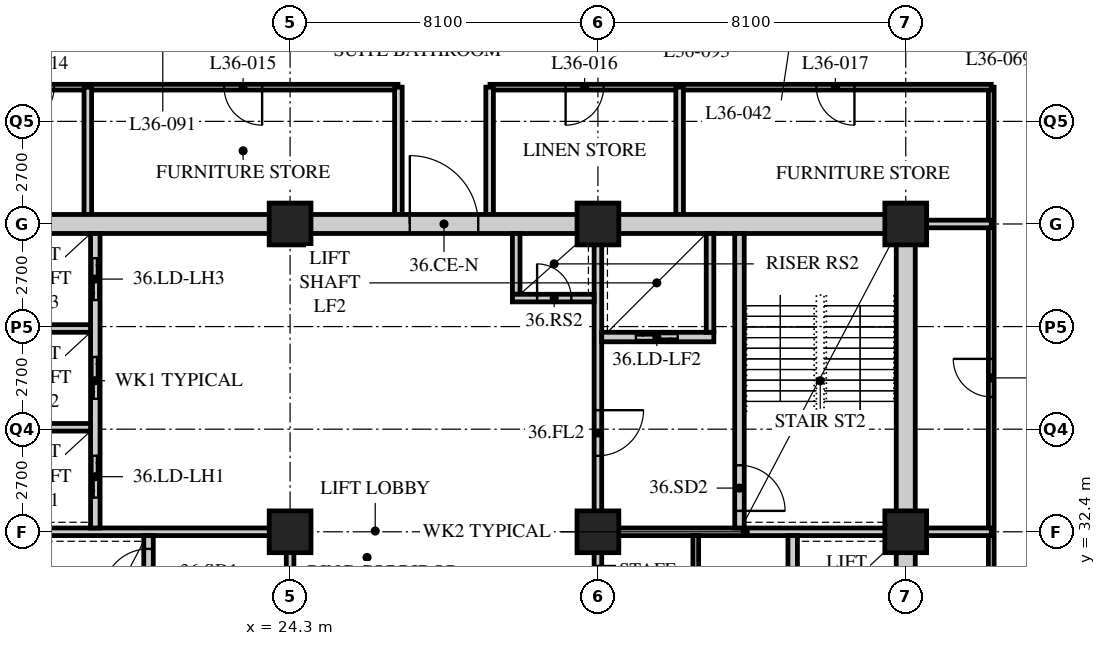
"""IFC4 building model, lengths in metres.
Left out: names, types, materials, properties, quantities, classifications, styles, units other than length and angle.
Written with IfcOpenShell. Run it as: python <this file> out.ifc"""

import sys

from ifc_helpers import new_model, si_unit, direction, frame, frame_2d, origin, origin_2d, place, context, subcontext, project, spatial, rectangle, hollow_rectangle, extrude, element, fill, save


model = new_model("IFC4")
c1 = context("Model", 3, precision=1e-05, world=origin(), true_north=direction((0.0, 1.0)))
c2 = subcontext(c1, "Body", "Model", "MODEL_VIEW")
j1 = project(units=[si_unit("LENGTHUNIT", "METRE"), si_unit("PLANEANGLEUNIT", "RADIAN")], contexts=[c1])
p1 = place(None, origin())
s1 = spatial("IfcSite", under=j1, at=p1, CompositionType="ELEMENT")
p2 = place(p1, origin())
s2 = spatial("IfcBuilding", under=s1, at=p2, CompositionType="ELEMENT")
p3 = place(p2, frame((0.0, 0.0, 140.8)))
s3 = spatial("IfcBuildingStorey", under=s2, at=p3, CompositionType="ELEMENT", Elevation=140.8)
for number, where, z_axis, x_axis in (
    (1, (24.3, 32.4, 0.0), (0.0, 0.0, 1.0), (1.0, 0.0, 0.0)),
    (2, (24.3, 40.5, 0.0), (0.0, 0.0, 1.0), (1.0, 0.0, 0.0)),
    (3, (32.4, 32.4, 0.0), (0.0, 0.0, 1.0), (1.0, 0.0, 0.0)),
    (4, (32.4, 40.5, 0.0), (0.0, 0.0, 1.0), (1.0, 0.0, 0.0)),
    (5, (40.5, 32.4, 0.0), (0.0, 0.0, 1.0), (1.0, 0.0, 0.0)),
    (6, (40.5, 40.5, 0.0), (0.0, 0.0, 1.0), (1.0, 0.0, 0.0)),
):
    element("IfcColumn", number, at=place(p3, frame(where, z_axis=z_axis, x_axis=x_axis)), inside=s3, PredefinedType="COLUMN", context=c2, shape_type="SweptSolid", body=[
        extrude(hollow_rectangle(XDim=1.1, YDim=1.1, WallThickness=0.1, at=origin_2d()), origin(), (0.0, 0.0, 1.0), 3.4),
    ])
p4 = place(p3, frame((42.75, 19.35, 0.0), z_axis=(0.0, 0.0, 1.0), x_axis=(0.0, 1.0, 0.0)))
e7 = element("IfcWall", 7, at=p4, inside=s3, PredefinedType="PARTITIONING", context=c2, shape_type="SweptSolid", body=[
    extrude(rectangle(XDim=24.75, YDim=0.15, at=frame_2d((12.375, 0.0))), origin(), (0.0, 0.0, 1.0), 3.19),
])
p5 = place(p4, frame((8.5, 0.0, 0.0)))
e8 = element("IfcOpeningElement", 8, at=p5, cuts=e7, PredefinedType="OPENING", context=c2, shape_type="SweptSolid", body=[
    extrude(rectangle(XDim=1.0, YDim=2.1, at=frame_2d((0.5, 1.05))), frame((0.0, 0.085, 0.0), z_axis=(0.0, -1.0, 0.0), x_axis=(1.0, 0.0, 0.0)), (0.0, 0.0, 1.0), 0.17),
])
p6 = place(p4, frame((16.6, 0.0, 0.0)))
e9 = element("IfcOpeningElement", 9, at=p6, cuts=e7, PredefinedType="OPENING", context=c2, shape_type="SweptSolid", body=[
    extrude(rectangle(XDim=1.0, YDim=2.1, at=frame_2d((0.5, 1.05))), frame((0.0, 0.085, 0.0), z_axis=(0.0, -1.0, 0.0), x_axis=(1.0, 0.0, 0.0)), (0.0, 0.0, 1.0), 0.17),
])
p7 = place(p3, frame((42.75, 44.1, 0.0), z_axis=(0.0, 0.0, 1.0), x_axis=(-1.0, 0.0, 0.0)))
e10 = element("IfcWall", 10, at=p7, inside=s3, PredefinedType="PARTITIONING", context=c2, shape_type="SweptSolid", body=[
    extrude(rectangle(XDim=13.19, YDim=0.15, at=frame_2d((6.595, 0.0))), origin(), (0.0, 0.0, 1.0), 3.19),
])
p8 = place(p7, frame((10.2, 0.0, 0.0)))
e11 = element("IfcOpeningElement", 11, at=p8, cuts=e10, PredefinedType="OPENING", context=c2, shape_type="SweptSolid", body=[
    extrude(rectangle(XDim=1.0, YDim=2.1, at=frame_2d((0.5, 1.05))), frame((0.0, 0.085, 0.0), z_axis=(0.0, -1.0, 0.0), x_axis=(1.0, 0.0, 0.0)), (0.0, 0.0, 1.0), 0.17),
])
p9 = place(p7, frame((3.6, 0.0, 0.0)))
e12 = element("IfcOpeningElement", 12, at=p9, cuts=e10, PredefinedType="OPENING", context=c2, shape_type="SweptSolid", body=[
    extrude(rectangle(XDim=1.0, YDim=2.1, at=frame_2d((0.5, 1.05))), frame((0.0, 0.085, 0.0), z_axis=(0.0, -1.0, 0.0), x_axis=(1.0, 0.0, 0.0)), (0.0, 0.0, 1.0), 0.17),
])
p10 = place(p3, frame((27.14, 44.1, 0.0), z_axis=(0.0, 0.0, 1.0), x_axis=(-1.0, 0.0, 0.0)))
e13 = element("IfcWall", 13, at=p10, inside=s3, PredefinedType="PARTITIONING", context=c2, shape_type="SweptSolid", body=[
    extrude(rectangle(XDim=17.24, YDim=0.15, at=frame_2d((8.62, 0.0))), origin(), (0.0, 0.0, 1.0), 3.19),
])
p11 = place(p10, frame((13.59, 0.0, 0.0)))
e14 = element("IfcOpeningElement", 14, at=p11, cuts=e13, PredefinedType="OPENING", context=c2, shape_type="SweptSolid", body=[
    extrude(rectangle(XDim=1.0, YDim=2.1, at=frame_2d((0.5, 1.05))), frame((0.0, 0.085, 0.0), z_axis=(0.0, -1.0, 0.0), x_axis=(1.0, 0.0, 0.0)), (0.0, 0.0, 1.0), 0.17),
])
p12 = place(p10, frame((9.051, 0.0, 0.0)))
e15 = element("IfcOpeningElement", 15, at=p12, cuts=e13, PredefinedType="OPENING", context=c2, shape_type="SweptSolid", body=[
    extrude(rectangle(XDim=1.0, YDim=2.1, at=frame_2d((0.5, 1.05))), frame((0.0, 0.085, 0.0), z_axis=(0.0, -1.0, 0.0), x_axis=(1.0, 0.0, 0.0)), (0.0, 0.0, 1.0), 0.17),
])
p13 = place(p10, frame((3.576, 0.0, 0.0)))
e16 = element("IfcOpeningElement", 16, at=p13, cuts=e13, PredefinedType="OPENING", context=c2, shape_type="SweptSolid", body=[
    extrude(rectangle(XDim=1.0, YDim=2.1, at=frame_2d((0.5, 1.05))), frame((0.0, 0.085, 0.0), z_axis=(0.0, -1.0, 0.0), x_axis=(1.0, 0.0, 0.0)), (0.0, 0.0, 1.0), 0.17),
])
p14 = place(p3, frame((40.5, 32.4, 0.0), z_axis=(0.0, 0.0, 1.0), x_axis=(1.0, 0.0, 0.0)))
e17 = element("IfcWall", 17, at=p14, inside=s3, PredefinedType="SOLIDWALL", context=c2, shape_type="SweptSolid", body=[
    extrude(rectangle(XDim=2.25, YDim=0.2, at=frame_2d((1.125, 0.0))), origin(), (0.0, 0.0, 1.0), 3.19),
])
for number, where, z_axis, x_axis in (
    (18, (18.978, 44.1, 0.0), (0.0, 0.0, 1.0), (0.0, -1.0, 0.0)),
    (19, (34.55, 44.1, 0.0), (0.0, 0.0, 1.0), (0.0, -1.0, 0.0)),
    (20, (27.15, 40.5, 0.0), (0.0, 0.0, 1.0), (0.0, 1.0, 0.0)),
    (21, (29.55, 40.5, 0.0), (0.0, 0.0, 1.0), (0.0, 1.0, 0.0)),
):
    element("IfcWall", number, at=place(p3, frame(where, z_axis=z_axis, x_axis=x_axis)), inside=s3, PredefinedType="SOLIDWALL", context=c2, shape_type="SweptSolid", body=[
        extrude(rectangle(XDim=3.6, YDim=0.2, at=frame_2d((1.8, 0.0))), origin(), (0.0, 0.0, 1.0), 3.19),
    ])
p15 = place(p3, frame((40.5, 40.5, 0.0), z_axis=(0.0, 0.0, 1.0), x_axis=(1.0, 0.0, 0.0)))
e22 = element("IfcWall", 22, at=p15, inside=s3, PredefinedType="SOLIDWALL", context=c2, shape_type="SweptSolid", body=[
    extrude(rectangle(XDim=2.25, YDim=0.2, at=frame_2d((1.125, 0.0))), origin(), (0.0, 0.0, 1.0), 3.19),
])
p16 = place(p3, frame((15.95, 40.5, 0.0), z_axis=(0.0, 0.0, 1.0), x_axis=(1.0, 0.0, 0.0)))
e23 = element("IfcWall", 23, at=p16, inside=s3, PredefinedType="SOLIDWALL", context=c2, shape_type="SweptSolid", body=[
    extrude(rectangle(XDim=24.8, YDim=0.5, at=frame_2d((12.4, 0.0))), origin(), (0.0, 0.0, 1.0), 2.54),
])
p17 = place(p16, frame((11.5, 0.0, 0.0)))
e24 = element("IfcOpeningElement", 24, at=p17, cuts=e23, PredefinedType="OPENING", context=c2, shape_type="SweptSolid", body=[
    extrude(rectangle(XDim=1.8, YDim=2.4, at=frame_2d((0.9, 1.2))), frame((0.0, 0.26, 0.0), z_axis=(0.0, -1.0, 0.0), x_axis=(1.0, 0.0, 0.0)), (0.0, 0.0, 1.0), 0.52),
])
p18 = place(p3, frame((40.5, 24.55, 0.0), z_axis=(0.0, 0.0, 1.0), x_axis=(0.0, 1.0, 0.0)))
e25 = element("IfcWall", 25, at=p18, inside=s3, PredefinedType="SOLIDWALL", context=c2, shape_type="SweptSolid", body=[
    extrude(rectangle(XDim=15.7, YDim=0.5, at=frame_2d((7.85, 0.0))), origin(), (0.0, 0.0, 1.0), 2.578),
])
p19 = place(p3, frame((16.45, 32.4, 0.0), z_axis=(0.0, 0.0, 1.0), x_axis=(1.0, 0.0, 0.0)))
e26 = element("IfcWall", 26, at=p19, inside=s3, PredefinedType="SOLIDWALL", context=c2, shape_type="SweptSolid", body=[
    extrude(rectangle(XDim=7.95, YDim=0.2, at=frame_2d((3.975, 0.0))), origin(), (0.0, 0.0, 1.0), 2.578),
])
p20 = place(p3, frame((24.3, 24.55, 0.0), z_axis=(0.0, 0.0, 1.0), x_axis=(0.0, 1.0, 0.0)))
e27 = element("IfcWall", 27, at=p20, inside=s3, PredefinedType="SOLIDWALL", context=c2, shape_type="SweptSolid", body=[
    extrude(rectangle(XDim=7.75, YDim=0.2, at=frame_2d((3.875, 0.0))), origin(), (0.0, 0.0, 1.0), 2.578),
])
p21 = place(p20, frame((4.6, 0.0, 0.0)))
e28 = element("IfcOpeningElement", 28, at=p21, cuts=e27, PredefinedType="OPENING", context=c2, shape_type="SweptSolid", body=[
    extrude(rectangle(XDim=1.2, YDim=2.1, at=frame_2d((0.6, 1.05))), frame((0.0, 0.11, 0.0), z_axis=(0.0, -1.0, 0.0), x_axis=(1.0, 0.0, 0.0)), (0.0, 0.0, 1.0), 0.22),
])
p22 = place(p3, frame((20.575, 24.55, 0.0), z_axis=(0.0, 0.0, 1.0), x_axis=(0.0, 1.0, 0.0)))
e29 = element("IfcWall", 29, at=p22, inside=s3, PredefinedType="SOLIDWALL", context=c2, shape_type="SweptSolid", body=[
    extrude(rectangle(XDim=7.75, YDim=0.25, at=frame_2d((3.875, 0.0))), origin(), (0.0, 0.0, 1.0), 3.19),
])
p23 = place(p22, frame((6.2, 0.0, 0.0)))
e30 = element("IfcOpeningElement", 30, at=p23, cuts=e29, PredefinedType="OPENING", context=c2, shape_type="SweptSolid", body=[
    extrude(rectangle(XDim=1.2, YDim=2.1, at=frame_2d((0.6, 1.05))), frame((0.0, 0.135, 0.0), z_axis=(0.0, -1.0, 0.0), x_axis=(1.0, 0.0, 0.0)), (0.0, 0.0, 1.0), 0.27),
])
p24 = place(p3, frame((19.175, 32.5, 0.0), z_axis=(0.0, 0.0, 1.0), x_axis=(0.0, 1.0, 0.0)))
e31 = element("IfcWall", 31, at=p24, inside=s3, PredefinedType="SOLIDWALL", context=c2, shape_type="SweptSolid", body=[
    extrude(rectangle(XDim=7.75, YDim=0.25, at=frame_2d((3.875, 0.0))), origin(), (0.0, 0.0, 1.0), 3.19),
])
p25 = place(p24, frame((0.8, 0.0, 0.0)))
e32 = element("IfcOpeningElement", 32, at=p25, cuts=e31, PredefinedType="OPENING", context=c2, shape_type="SweptSolid", body=[
    extrude(rectangle(XDim=1.1, YDim=2.4, at=frame_2d((0.55, 1.2))), frame((0.0, 0.135, 0.0), z_axis=(0.0, -1.0, 0.0), x_axis=(1.0, 0.0, 0.0)), (0.0, 0.0, 1.0), 0.27),
])
p26 = place(p24, frame((3.4, 0.0, 0.0)))
e33 = element("IfcOpeningElement", 33, at=p26, cuts=e31, PredefinedType="OPENING", context=c2, shape_type="SweptSolid", body=[
    extrude(rectangle(XDim=1.1, YDim=2.4, at=frame_2d((0.55, 1.2))), frame((0.0, 0.135, 0.0), z_axis=(0.0, -1.0, 0.0), x_axis=(1.0, 0.0, 0.0)), (0.0, 0.0, 1.0), 0.27),
])
p27 = place(p24, frame((6.0, 0.0, 0.0)))
e34 = element("IfcOpeningElement", 34, at=p27, cuts=e31, PredefinedType="OPENING", context=c2, shape_type="SweptSolid", body=[
    extrude(rectangle(XDim=1.1, YDim=2.4, at=frame_2d((0.55, 1.2))), frame((0.0, 0.135, 0.0), z_axis=(0.0, -1.0, 0.0), x_axis=(1.0, 0.0, 0.0)), (0.0, 0.0, 1.0), 0.27),
])
for number, where, z_axis, x_axis in (
    (35, (16.45, 35.15, 0.0), (0.0, 0.0, 1.0), (1.0, 0.0, 0.0)),
    (36, (16.45, 37.75, 0.0), (0.0, 0.0, 1.0), (1.0, 0.0, 0.0)),
):
    element("IfcWall", number, at=place(p3, frame(where, z_axis=z_axis, x_axis=x_axis)), inside=s3, PredefinedType="SOLIDWALL", context=c2, shape_type="SweptSolid", body=[
        extrude(rectangle(XDim=2.6, YDim=0.2, at=frame_2d((1.3, 0.0))), origin(), (0.0, 0.0, 1.0), 3.19),
    ])
p28 = place(p3, frame((32.3, 32.4, 0.0), z_axis=(0.0, 0.0, 1.0), x_axis=(1.0, 0.0, 0.0)))
e37 = element("IfcWall", 37, at=p28, inside=s3, PredefinedType="SOLIDWALL", context=c2, shape_type="SweptSolid", body=[
    extrude(rectangle(XDim=7.95, YDim=0.2, at=frame_2d((3.975, 0.0))), origin(), (0.0, 0.0, 1.0), 2.578),
])
p29 = place(p3, frame((32.4, 32.5, 0.0), z_axis=(0.0, 0.0, 1.0), x_axis=(0.0, 1.0, 0.0)))
e38 = element("IfcWall", 38, at=p29, inside=s3, PredefinedType="SOLIDWALL", context=c2, shape_type="SweptSolid", body=[
    extrude(rectangle(XDim=7.75, YDim=0.2, at=frame_2d((3.875, 0.0))), origin(), (0.0, 0.0, 1.0), 2.578),
])
p30 = place(p29, frame((1.9, 0.0, 0.0)))
e39 = element("IfcOpeningElement", 39, at=p30, cuts=e38, PredefinedType="OPENING", context=c2, shape_type="SweptSolid", body=[
    extrude(rectangle(XDim=1.2, YDim=2.1, at=frame_2d((0.6, 1.05))), frame((0.0, 0.11, 0.0), z_axis=(0.0, -1.0, 0.0), x_axis=(1.0, 0.0, 0.0)), (0.0, 0.0, 1.0), 0.22),
])
p31 = place(p3, frame((37.525, 24.55, 0.0), z_axis=(0.0, 0.0, 1.0), x_axis=(0.0, 1.0, 0.0)))
e40 = element("IfcWall", 40, at=p31, inside=s3, PredefinedType="SOLIDWALL", context=c2, shape_type="SweptSolid", body=[
    extrude(rectangle(XDim=7.75, YDim=0.25, at=frame_2d((3.875, 0.0))), origin(), (0.0, 0.0, 1.0), 3.19),
])
p32 = place(p3, frame((36.125, 32.5, 0.0), z_axis=(0.0, 0.0, 1.0), x_axis=(0.0, 1.0, 0.0)))
e41 = element("IfcWall", 41, at=p32, inside=s3, PredefinedType="SOLIDWALL", context=c2, shape_type="SweptSolid", body=[
    extrude(rectangle(XDim=7.75, YDim=0.25, at=frame_2d((3.875, 0.0))), origin(), (0.0, 0.0, 1.0), 3.19),
])
p33 = place(p32, frame((0.45, 0.0, 0.0)))
e42 = element("IfcOpeningElement", 42, at=p33, cuts=e41, PredefinedType="OPENING", context=c2, shape_type="SweptSolid", body=[
    extrude(rectangle(XDim=1.2, YDim=2.1, at=frame_2d((0.6, 1.05))), frame((0.0, 0.135, 0.0), z_axis=(0.0, -1.0, 0.0), x_axis=(1.0, 0.0, 0.0)), (0.0, 0.0, 1.0), 0.27),
])
p34 = place(p3, frame((32.5, 37.525, 0.0), z_axis=(0.0, 0.0, 1.0), x_axis=(1.0, 0.0, 0.0)))
e43 = element("IfcWall", 43, at=p34, inside=s3, PredefinedType="SOLIDWALL", context=c2, shape_type="SweptSolid", body=[
    extrude(rectangle(XDim=2.95, YDim=0.25, at=frame_2d((1.475, 0.0))), origin(), (0.0, 0.0, 1.0), 3.19),
])
p35 = place(p34, frame((0.9, 0.0, 0.0)))
e44 = element("IfcOpeningElement", 44, at=p35, cuts=e43, PredefinedType="OPENING", context=c2, shape_type="SweptSolid", body=[
    extrude(rectangle(XDim=1.1, YDim=2.4, at=frame_2d((0.55, 1.2))), frame((0.0, 0.135, 0.0), z_axis=(0.0, -1.0, 0.0), x_axis=(1.0, 0.0, 0.0)), (0.0, 0.0, 1.0), 0.27),
])
p36 = place(p3, frame((35.35, 37.65, 0.0), z_axis=(0.0, 0.0, 1.0), x_axis=(0.0, 1.0, 0.0)))
e45 = element("IfcWall", 45, at=p36, inside=s3, PredefinedType="SOLIDWALL", context=c2, shape_type="SweptSolid", body=[
    extrude(rectangle(XDim=2.6, YDim=0.2, at=frame_2d((1.3, 0.0))), origin(), (0.0, 0.0, 1.0), 3.19),
])
p37 = place(p3, frame((30.25, 38.65, 0.0), z_axis=(0.0, 0.0, 1.0), x_axis=(0.0, 1.0, 0.0)))
e46 = element("IfcWall", 46, at=p37, inside=s3, PredefinedType="SOLIDWALL", context=c2, shape_type="SweptSolid", body=[
    extrude(rectangle(XDim=1.6, YDim=0.2, at=frame_2d((0.8, 0.0))), origin(), (0.0, 0.0, 1.0), 3.19),
])
p38 = place(p3, frame((30.15, 38.55, 0.0), z_axis=(0.0, 0.0, 1.0), x_axis=(1.0, 0.0, 0.0)))
e47 = element("IfcWall", 47, at=p38, inside=s3, PredefinedType="SOLIDWALL", context=c2, shape_type="SweptSolid", body=[
    extrude(rectangle(XDim=2.15, YDim=0.2, at=frame_2d((1.075, 0.0))), origin(), (0.0, 0.0, 1.0), 3.19),
])
p39 = place(p38, frame((0.65, 0.0, 0.0)))
e48 = element("IfcOpeningElement", 48, at=p39, cuts=e47, PredefinedType="OPENING", context=c2, shape_type="SweptSolid", body=[
    extrude(rectangle(XDim=0.9, YDim=2.1, at=frame_2d((0.45, 1.05))), frame((0.0, 0.11, 0.0), z_axis=(0.0, -1.0, 0.0), x_axis=(1.0, 0.0, 0.0)), (0.0, 0.0, 1.0), 0.22),
])
p40 = place(p3, frame((32.4, 24.55, 0.0), z_axis=(0.0, 0.0, 1.0), x_axis=(0.0, 1.0, 0.0)))
e49 = element("IfcWall", 49, at=p40, inside=s3, PredefinedType="PARTITIONING", context=c2, shape_type="SweptSolid", body=[
    extrude(rectangle(XDim=7.75, YDim=0.2, at=frame_2d((3.875, 0.0))), origin(), (0.0, 0.0, 1.0), 2.578),
])
p41 = place(p40, frame((0.65, 0.0, 0.0)))
e50 = element("IfcOpeningElement", 50, at=p41, cuts=e49, PredefinedType="OPENING", context=c2, shape_type="SweptSolid", body=[
    extrude(rectangle(XDim=0.9, YDim=2.1, at=frame_2d((0.45, 1.05))), frame((0.0, 0.11, 0.0), z_axis=(0.0, -1.0, 0.0), x_axis=(1.0, 0.0, 0.0)), (0.0, 0.0, 1.0), 0.22),
])
p42 = place(p40, frame((2.15, 0.0, 0.0)))
e51 = element("IfcOpeningElement", 51, at=p42, cuts=e49, PredefinedType="OPENING", context=c2, shape_type="SweptSolid", body=[
    extrude(rectangle(XDim=0.9, YDim=2.1, at=frame_2d((0.45, 1.05))), frame((0.0, 0.11, 0.0), z_axis=(0.0, -1.0, 0.0), x_axis=(1.0, 0.0, 0.0)), (0.0, 0.0, 1.0), 0.22),
])
p43 = place(p40, frame((3.8, 0.0, 0.0)))
e52 = element("IfcOpeningElement", 52, at=p43, cuts=e49, PredefinedType="OPENING", context=c2, shape_type="SweptSolid", body=[
    extrude(rectangle(XDim=1.0, YDim=2.1, at=frame_2d((0.5, 1.05))), frame((0.0, 0.11, 0.0), z_axis=(0.0, -1.0, 0.0), x_axis=(1.0, 0.0, 0.0)), (0.0, 0.0, 1.0), 0.22),
])
p44 = place(p40, frame((6.05, 0.0, 0.0)))
e53 = element("IfcOpeningElement", 53, at=p44, cuts=e49, PredefinedType="OPENING", context=c2, shape_type="SweptSolid", body=[
    extrude(rectangle(XDim=0.9, YDim=2.1, at=frame_2d((0.45, 1.05))), frame((0.0, 0.11, 0.0), z_axis=(0.0, -1.0, 0.0), x_axis=(1.0, 0.0, 0.0)), (0.0, 0.0, 1.0), 0.22),
])
p45 = place(p3, frame((34.975, 28.05, 0.0), z_axis=(0.0, 0.0, 1.0), x_axis=(0.0, 1.0, 0.0)))
e54 = element("IfcWall", 54, at=p45, inside=s3, PredefinedType="PARTITIONING", context=c2, shape_type="SweptSolid", body=[
    extrude(rectangle(XDim=4.25, YDim=0.15, at=frame_2d((2.125, 0.0))), origin(), (0.0, 0.0, 1.0), 3.19),
])
p46 = place(p6, origin())
e55 = element("IfcDoor", 55, at=p46, inside=s3, OperationType="SINGLE_SWING_RIGHT", PredefinedType="DOOR", context=c2, shape_type="SweptSolid", body=[
    extrude(rectangle(XDim=1.0, YDim=2.1, at=frame_2d((0.5, 1.05))), frame((0.0, 0.025, 0.0), z_axis=(0.0, -1.0, 0.0), x_axis=(1.0, 0.0, 0.0)), (0.0, 0.0, 1.0), 0.05),
])
fill(e9, e55)
p47 = place(p12, origin())
e56 = element("IfcDoor", 56, at=p47, inside=s3, OperationType="SINGLE_SWING_RIGHT", PredefinedType="DOOR", context=c2, shape_type="SweptSolid", body=[
    extrude(rectangle(XDim=1.0, YDim=2.1, at=frame_2d((0.5, 1.05))), frame((0.0, 0.025, 0.0), z_axis=(0.0, -1.0, 0.0), x_axis=(1.0, 0.0, 0.0)), (0.0, 0.0, 1.0), 0.05),
])
fill(e15, e56)
p48 = place(p13, origin())
e57 = element("IfcDoor", 57, at=p48, inside=s3, OperationType="SINGLE_SWING_LEFT", PredefinedType="DOOR", context=c2, shape_type="SweptSolid", body=[
    extrude(rectangle(XDim=1.0, YDim=2.1, at=frame_2d((0.5, 1.05))), frame((0.0, 0.025, 0.0), z_axis=(0.0, -1.0, 0.0), x_axis=(1.0, 0.0, 0.0)), (0.0, 0.0, 1.0), 0.05),
])
fill(e16, e57)
p49 = place(p8, origin())
e58 = element("IfcDoor", 58, at=p49, inside=s3, OperationType="SINGLE_SWING_RIGHT", PredefinedType="DOOR", context=c2, shape_type="SweptSolid", body=[
    extrude(rectangle(XDim=1.0, YDim=2.1, at=frame_2d((0.5, 1.05))), frame((0.0, 0.025, 0.0), z_axis=(0.0, -1.0, 0.0), x_axis=(1.0, 0.0, 0.0)), (0.0, 0.0, 1.0), 0.05),
])
fill(e11, e58)
p50 = place(p9, origin())
e59 = element("IfcDoor", 59, at=p50, inside=s3, OperationType="SINGLE_SWING_LEFT", PredefinedType="DOOR", context=c2, shape_type="SweptSolid", body=[
    extrude(rectangle(XDim=1.0, YDim=2.1, at=frame_2d((0.5, 1.05))), frame((0.0, 0.025, 0.0), z_axis=(0.0, -1.0, 0.0), x_axis=(1.0, 0.0, 0.0)), (0.0, 0.0, 1.0), 0.05),
])
fill(e12, e59)
p51 = place(p23, origin())
e60 = element("IfcDoor", 60, at=p51, inside=s3, OperationType="SINGLE_SWING_LEFT", PredefinedType="DOOR", context=c2, shape_type="SweptSolid", body=[
    extrude(rectangle(XDim=1.2, YDim=2.1, at=frame_2d((0.6, 1.05))), frame((0.0, 0.025, 0.0), z_axis=(0.0, -1.0, 0.0), x_axis=(1.0, 0.0, 0.0)), (0.0, 0.0, 1.0), 0.05),
])
fill(e30, e60)
p52 = place(p33, origin())
e61 = element("IfcDoor", 61, at=p52, inside=s3, OperationType="SINGLE_SWING_RIGHT", PredefinedType="DOOR", context=c2, shape_type="SweptSolid", body=[
    extrude(rectangle(XDim=1.2, YDim=2.1, at=frame_2d((0.6, 1.05))), frame((0.0, 0.025, 0.0), z_axis=(0.0, -1.0, 0.0), x_axis=(1.0, 0.0, 0.0)), (0.0, 0.0, 1.0), 0.05),
])
fill(e42, e61)
p53 = place(p30, origin())
e62 = element("IfcDoor", 62, at=p53, inside=s3, OperationType="SINGLE_SWING_LEFT", PredefinedType="DOOR", context=c2, shape_type="SweptSolid", body=[
    extrude(rectangle(XDim=1.2, YDim=2.1, at=frame_2d((0.6, 1.05))), frame((0.0, 0.025, 0.0), z_axis=(0.0, -1.0, 0.0), x_axis=(1.0, 0.0, 0.0)), (0.0, 0.0, 1.0), 0.05),
])
fill(e39, e62)
p54 = place(p39, origin())
e63 = element("IfcDoor", 63, at=p54, inside=s3, OperationType="SINGLE_SWING_LEFT", PredefinedType="DOOR", context=c2, shape_type="SweptSolid", body=[
    extrude(rectangle(XDim=0.9, YDim=2.1, at=frame_2d((0.45, 1.05))), frame((0.0, 0.025, 0.0), z_axis=(0.0, -1.0, 0.0), x_axis=(1.0, 0.0, 0.0)), (0.0, 0.0, 1.0), 0.05),
])
fill(e48, e63)
p55 = place(p25, origin())
e64 = element("IfcDoor", 64, at=p55, inside=s3, OperationType="DOUBLE_DOOR_SLIDING", PredefinedType="DOOR", context=c2, shape_type="SweptSolid", body=[
    extrude(rectangle(XDim=1.1, YDim=2.4, at=frame_2d((0.55, 1.2))), frame((0.0, 0.025, 0.0), z_axis=(0.0, -1.0, 0.0), x_axis=(1.0, 0.0, 0.0)), (0.0, 0.0, 1.0), 0.05),
])
fill(e32, e64)
p56 = place(p26, origin())
e65 = element("IfcDoor", 65, at=p56, inside=s3, OperationType="DOUBLE_DOOR_SLIDING", PredefinedType="DOOR", context=c2, shape_type="SweptSolid", body=[
    extrude(rectangle(XDim=1.1, YDim=2.4, at=frame_2d((0.55, 1.2))), frame((0.0, 0.025, 0.0), z_axis=(0.0, -1.0, 0.0), x_axis=(1.0, 0.0, 0.0)), (0.0, 0.0, 1.0), 0.05),
])
fill(e33, e65)
p57 = place(p27, origin())
e66 = element("IfcDoor", 66, at=p57, inside=s3, OperationType="DOUBLE_DOOR_SLIDING", PredefinedType="DOOR", context=c2, shape_type="SweptSolid", body=[
    extrude(rectangle(XDim=1.1, YDim=2.4, at=frame_2d((0.55, 1.2))), frame((0.0, 0.025, 0.0), z_axis=(0.0, -1.0, 0.0), x_axis=(1.0, 0.0, 0.0)), (0.0, 0.0, 1.0), 0.05),
])
fill(e34, e66)
p58 = place(p35, origin())
e67 = element("IfcDoor", 67, at=p58, inside=s3, OperationType="DOUBLE_DOOR_SLIDING", PredefinedType="DOOR", context=c2, shape_type="SweptSolid", body=[
    extrude(rectangle(XDim=1.1, YDim=2.4, at=frame_2d((0.55, 1.2))), frame((0.0, 0.025, 0.0), z_axis=(0.0, -1.0, 0.0), x_axis=(1.0, 0.0, 0.0)), (0.0, 0.0, 1.0), 0.05),
])
fill(e44, e67)
p59 = place(p17, origin())
e68 = element("IfcDoor", 68, at=p59, inside=s3, OperationType="DOUBLE_DOOR_SINGLE_SWING", PredefinedType="DOOR", context=c2, shape_type="SweptSolid", body=[
    extrude(rectangle(XDim=1.8, YDim=2.4, at=frame_2d((0.9, 1.2))), frame((0.0, 0.025, 0.0), z_axis=(0.0, -1.0, 0.0), x_axis=(1.0, 0.0, 0.0)), (0.0, 0.0, 1.0), 0.05),
])
fill(e24, e68)
save(model, sys.argv[1])
